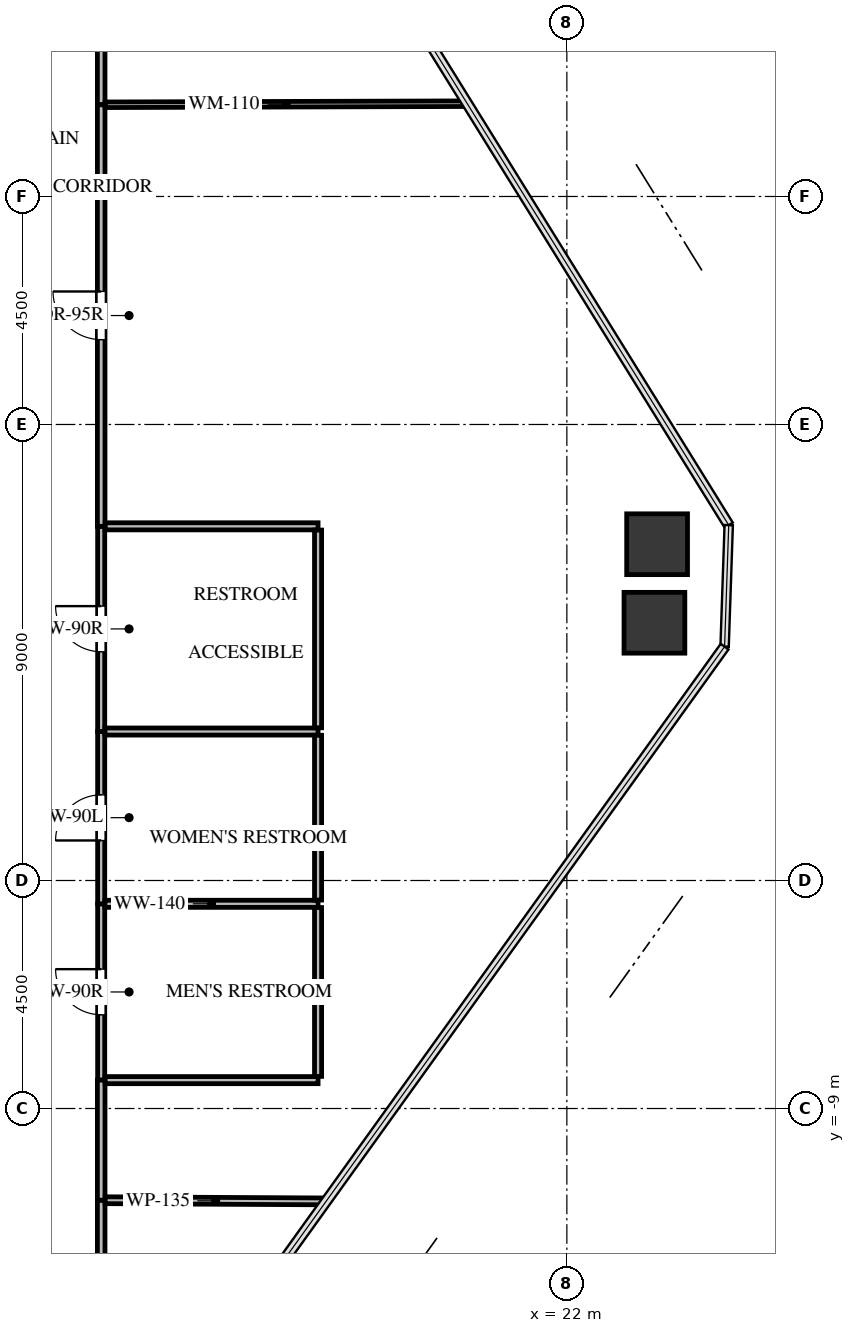
"""IFC4 building model, lengths in metres.
Left out: names, types, materials, properties, quantities, classifications, styles, units other than length and angle.
Written with IfcOpenShell. Run it as: python <this file> out.ifc"""

import sys

from ifc_helpers import new_model, si_unit, direction, frame, frame_2d, origin, origin_2d, place, context, subcontext, project, spatial, rectangle, extrude, source, transform, mapped, element, fill, save


model = new_model("IFC4")
c1 = context("Model", 3, precision=1e-05, world=origin(), true_north=direction((0.0, 1.0)))
c2 = subcontext(c1, "Body", "Model", "MODEL_VIEW")
j1 = project(units=[si_unit("LENGTHUNIT", "METRE"), si_unit("PLANEANGLEUNIT", "RADIAN")], contexts=[c1])
p1 = place(None, origin())
s1 = spatial("IfcSite", under=j1, at=p1, CompositionType="ELEMENT")
p2 = place(p1, origin())
s2 = spatial("IfcBuilding", under=s1, at=p2, CompositionType="ELEMENT")
p3 = place(p2, frame((0.0, 0.0, 97.5)))
s3 = spatial("IfcBuildingStorey", under=s2, at=p3, CompositionType="ELEMENT", Elevation=97.5)
m1 = source(origin(), c2, "Body", "SweptSolid", [
    extrude(rectangle(XDim=1.2, YDim=1.2, at=origin_2d()), origin(), (0.0, 0.0, 1.0), 3.3),
])
for number, where, z_axis, x_axis in (
    (1, (23.781, 2.137, -0.24), (0.0, 0.0, 1.0), (1.0, 0.0, 0.0)),
    (2, (23.728, 0.587, -0.24), (0.0, 0.0, 1.0), (1.0, 0.0, 0.0)),
):
    element("IfcColumn", number, at=place(p3, frame(where, z_axis=z_axis, x_axis=x_axis)), inside=s3, PredefinedType="COLUMN", context=c2, shape_type="MappedRepresentation", body=[
        mapped(m1, transform((0.0, 0.0, 0.0), x_axis=(1.0, 0.0, 0.0), y_axis=(0.0, 1.0, 0.0), z_axis=(0.0, 0.0, 1.0), scale=1.0)),
    ])
p4 = place(p3, frame((12.81, -8.44, 0.0), z_axis=(0.0, 0.0, 1.0), x_axis=(0.0, 1.0, 0.0)))
e3 = element("IfcWall", 3, at=p4, inside=s3, PredefinedType="PARTITIONING", context=c2, shape_type="SweptSolid", body=[
    extrude(rectangle(XDim=3.48, YDim=0.14, at=frame_2d((1.74, 0.0))), origin(), (0.0, 0.0, 1.0), 3.045),
])
p5 = place(p4, frame((1.29, 0.0, 0.0)))
e4 = element("IfcOpeningElement", 4, at=p5, cuts=e3, PredefinedType="OPENING", context=c2, shape_type="SweptSolid", body=[
    extrude(rectangle(XDim=0.9, YDim=2.05, at=frame_2d((0.45, 1.025))), frame((0.0, 0.08, 0.0), z_axis=(0.0, -1.0, 0.0), x_axis=(1.0, 0.0, 0.0)), (0.0, 0.0, 1.0), 0.16),
])
p6 = place(p3, frame((12.81, -4.96, 0.0), z_axis=(0.0, 0.0, 1.0), x_axis=(0.0, 1.0, 0.0)))
e5 = element("IfcWall", 5, at=p6, inside=s3, PredefinedType="PARTITIONING", context=c2, shape_type="SweptSolid", body=[
    extrude(rectangle(XDim=3.4, YDim=0.14, at=frame_2d((1.7, 0.0))), origin(), (0.0, 0.0, 1.0), 3.045),
])
p7 = place(p6, frame((1.25, 0.0, 0.0)))
e6 = element("IfcOpeningElement", 6, at=p7, cuts=e5, PredefinedType="OPENING", context=c2, shape_type="SweptSolid", body=[
    extrude(rectangle(XDim=0.9, YDim=2.05, at=frame_2d((0.45, 1.025))), frame((0.0, 0.08, 0.0), z_axis=(0.0, -1.0, 0.0), x_axis=(1.0, 0.0, 0.0)), (0.0, 0.0, 1.0), 0.16),
])
p8 = place(p3, frame((12.81, -1.56, 0.0), z_axis=(0.0, 0.0, 1.0), x_axis=(0.0, 1.0, 0.0)))
e7 = element("IfcWall", 7, at=p8, inside=s3, PredefinedType="PARTITIONING", context=c2, shape_type="SweptSolid", body=[
    extrude(rectangle(XDim=4.05, YDim=0.14, at=frame_2d((2.025, 0.0))), origin(), (0.0, 0.0, 1.0), 2.212),
])
p9 = place(p8, frame((1.575, 0.0, 0.0)))
e8 = element("IfcOpeningElement", 8, at=p9, cuts=e7, PredefinedType="OPENING", context=c2, shape_type="SweptSolid", body=[
    extrude(rectangle(XDim=0.9, YDim=2.05, at=frame_2d((0.45, 1.025))), frame((0.0, 0.08, 0.0), z_axis=(0.0, -1.0, 0.0), x_axis=(1.0, 0.0, 0.0)), (0.0, 0.0, 1.0), 0.16),
])
for number, where, z_axis, x_axis in (
    (9, (12.81, 10.81, 0.0), (0.0, 0.0, 1.0), (0.0, 1.0, 0.0)),
    (10, (12.81, -12.081, 0.0), (0.0, 0.0, 1.0), (0.0, 1.0, 0.0)),
):
    element("IfcWall", number, at=place(p3, frame(where, z_axis=z_axis, x_axis=x_axis)), inside=s3, PredefinedType="PARTITIONING", context=c2, shape_type="SweptSolid", body=[
        extrude(rectangle(XDim=1.271, YDim=0.15, at=frame_2d((0.635, 0.0))), origin(), (0.0, 0.0, 1.0), 3.045),
    ])
p10 = place(p3, frame((12.81, 2.49, 0.0), z_axis=(0.0, 0.0, 1.0), x_axis=(0.0, 1.0, 0.0)))
e11 = element("IfcWall", 11, at=p10, inside=s3, PredefinedType="PARTITIONING", context=c2, shape_type="SweptSolid", body=[
    extrude(rectangle(XDim=8.32, YDim=0.15, at=frame_2d((4.16, 0.0))), origin(), (0.0, 0.0, 1.0), 3.045),
])
p11 = place(p10, frame((3.685, 0.0, 0.0)))
e12 = element("IfcOpeningElement", 12, at=p11, cuts=e11, PredefinedType="OPENING", context=c2, shape_type="SweptSolid", body=[
    extrude(rectangle(XDim=0.95, YDim=2.1, at=frame_2d((0.475, 1.05))), frame((0.0, 0.085, 0.0), z_axis=(0.0, -1.0, 0.0), x_axis=(1.0, 0.0, 0.0)), (0.0, 0.0, 1.0), 0.17),
])
p12 = place(p3, frame((12.81, -10.81, 0.0), z_axis=(0.0, 0.0, 1.0), x_axis=(0.0, 1.0, 0.0)))
e13 = element("IfcWall", 13, at=p12, inside=s3, PredefinedType="PARTITIONING", context=c2, shape_type="SweptSolid", body=[
    extrude(rectangle(XDim=2.37, YDim=0.15, at=frame_2d((1.185, 0.0))), origin(), (0.0, 0.0, 1.0), 3.045),
])
p13 = place(p3, frame((12.884, -4.96, 0.0), z_axis=(0.0, 0.0, 1.0), x_axis=(1.0, 0.0, 0.0)))
e14 = element("IfcWall", 14, at=p13, inside=s3, PredefinedType="PARTITIONING", context=c2, shape_type="SweptSolid", body=[
    extrude(rectangle(XDim=4.206, YDim=0.14, at=frame_2d((2.103, 0.0))), origin(), (0.0, 0.0, 1.0), 3.045),
])
p14 = place(p3, frame((17.09, -8.44, 0.0), z_axis=(0.0, 0.0, 1.0), x_axis=(-1.0, 0.0, 0.0)))
e15 = element("IfcWall", 15, at=p14, inside=s3, PredefinedType="PARTITIONING", context=c2, shape_type="SweptSolid", body=[
    extrude(rectangle(XDim=4.201, YDim=0.14, at=frame_2d((2.101, 0.0))), origin(), (0.0, 0.0, 1.0), 2.38),
])
p15 = place(p3, frame((17.09, -5.034, 0.0), z_axis=(0.0, 0.0, 1.0), x_axis=(0.0, -1.0, 0.0)))
e16 = element("IfcWall", 16, at=p15, inside=s3, PredefinedType="PARTITIONING", context=c2, shape_type="SweptSolid", body=[
    extrude(rectangle(XDim=3.332, YDim=0.14, at=frame_2d((1.666, 0.0))), origin(), (0.0, 0.0, 1.0), 2.38),
])
p16 = place(p3, frame((12.884, -1.56, 0.0), z_axis=(0.0, 0.0, 1.0), x_axis=(1.0, 0.0, 0.0)))
e17 = element("IfcWall", 17, at=p16, inside=s3, PredefinedType="PARTITIONING", context=c2, shape_type="SweptSolid", body=[
    extrude(rectangle(XDim=4.206, YDim=0.14, at=frame_2d((2.103, 0.0))), origin(), (0.0, 0.0, 1.0), 3.045),
])
p17 = place(p3, frame((17.09, -1.634, 0.0), z_axis=(0.0, 0.0, 1.0), x_axis=(0.0, -1.0, 0.0)))
e18 = element("IfcWall", 18, at=p17, inside=s3, PredefinedType="PARTITIONING", context=c2, shape_type="SweptSolid", body=[
    extrude(rectangle(XDim=3.252, YDim=0.14, at=frame_2d((1.626, 0.0))), origin(), (0.0, 0.0, 1.0), 3.045),
])
p18 = place(p3, frame((12.889, 2.49, 0.0), z_axis=(0.0, 0.0, 1.0), x_axis=(1.0, 0.0, 0.0)))
e19 = element("IfcWall", 19, at=p18, inside=s3, PredefinedType="PARTITIONING", context=c2, shape_type="SweptSolid", body=[
    extrude(rectangle(XDim=4.201, YDim=0.14, at=frame_2d((2.101, 0.0))), origin(), (0.0, 0.0, 1.0), 3.045),
])
p19 = place(p3, frame((17.09, 2.416, 0.0), z_axis=(0.0, 0.0, 1.0), x_axis=(0.0, -1.0, 0.0)))
e20 = element("IfcWall", 20, at=p19, inside=s3, PredefinedType="PARTITIONING", context=c2, shape_type="SweptSolid", body=[
    extrude(rectangle(XDim=3.902, YDim=0.14, at=frame_2d((1.951, 0.0))), origin(), (0.0, 0.0, 1.0), 2.212),
])
p20 = place(p3, frame((20.035, 10.831, 0.0), z_axis=(0.0, 0.0, 1.0), x_axis=(-0.999995783715, -0.002903885812, 0.0)))
e21 = element("IfcWall", 21, at=p20, inside=s3, PredefinedType="MOVABLE", context=c2, shape_type="SweptSolid", body=[
    extrude(rectangle(XDim=7.146, YDim=0.11, at=frame_2d((3.573, 0.0))), origin(), (0.0, 0.0, 1.0), 2.38),
])
p21 = place(p3, frame((12.889, -10.81, 0.0), z_axis=(0.0, 0.0, 1.0), x_axis=(0.999986140562, -0.005264853658, 0.0)))
e22 = element("IfcWall", 22, at=p21, inside=s3, PredefinedType="PARTITIONING", context=c2, shape_type="SweptSolid", body=[
    extrude(rectangle(XDim=4.359, YDim=0.135, at=frame_2d((2.179, 0.0))), origin(), (0.0, 0.0, 1.0), 2.38),
])
m2 = source(origin(), c2, "Body", "SweptSolid", [
    extrude(rectangle(XDim=0.9, YDim=2.05, at=frame_2d((0.45, 1.025))), frame((0.0, 0.025, 0.0), z_axis=(0.0, -1.0, 0.0), x_axis=(1.0, 0.0, 0.0)), (0.0, 0.0, 1.0), 0.05),
])
p22 = place(p5, origin())
e23 = element("IfcDoor", 23, at=p22, inside=s3, OperationType="SINGLE_SWING_RIGHT", PredefinedType="DOOR", context=c2, shape_type="MappedRepresentation", body=[
    mapped(m2, transform((0.0, 0.0, 0.0), x_axis=(1.0, 0.0, 0.0), y_axis=(0.0, 1.0, 0.0), z_axis=(0.0, 0.0, 1.0), scale=1.0)),
])
fill(e4, e23)
m3 = source(origin(), c2, "Body", "SweptSolid", [
    extrude(rectangle(XDim=0.9, YDim=2.05, at=frame_2d((0.45, 1.025))), frame((0.0, 0.025, 0.0), z_axis=(0.0, -1.0, 0.0), x_axis=(1.0, 0.0, 0.0)), (0.0, 0.0, 1.0), 0.05),
])
p23 = place(p7, origin())
e24 = element("IfcDoor", 24, at=p23, inside=s3, OperationType="SINGLE_SWING_LEFT", PredefinedType="DOOR", context=c2, shape_type="MappedRepresentation", body=[
    mapped(m3, transform((0.0, 0.0, 0.0), x_axis=(1.0, 0.0, 0.0), y_axis=(0.0, 1.0, 0.0), z_axis=(0.0, 0.0, 1.0), scale=1.0)),
])
fill(e6, e24)
p24 = place(p9, origin())
e25 = element("IfcDoor", 25, at=p24, inside=s3, OperationType="SINGLE_SWING_RIGHT", PredefinedType="DOOR", context=c2, shape_type="MappedRepresentation", body=[
    mapped(m2, transform((0.0, 0.0, 0.0), x_axis=(1.0, 0.0, 0.0), y_axis=(0.0, 1.0, 0.0), z_axis=(0.0, 0.0, 1.0), scale=1.0)),
])
fill(e8, e25)
m4 = source(origin(), c2, "Body", "SweptSolid", [
    extrude(rectangle(XDim=0.95, YDim=2.1, at=frame_2d((0.475, 1.05))), frame((0.0, 0.025, 0.0), z_axis=(0.0, -1.0, 0.0), x_axis=(1.0, 0.0, 0.0)), (0.0, 0.0, 1.0), 0.05),
])
p25 = place(p11, origin())
e26 = element("IfcDoor", 26, at=p25, inside=s3, OperationType="SINGLE_SWING_RIGHT", PredefinedType="DOOR", context=c2, shape_type="MappedRepresentation", body=[
    mapped(m4, transform((0.0, 0.0, 0.0), x_axis=(1.0, 0.0, 0.0), y_axis=(0.0, 1.0, 0.0), z_axis=(0.0, 0.0, 1.0), scale=1.0)),
])
fill(e12, e26)
save(model, sys.argv[1])
